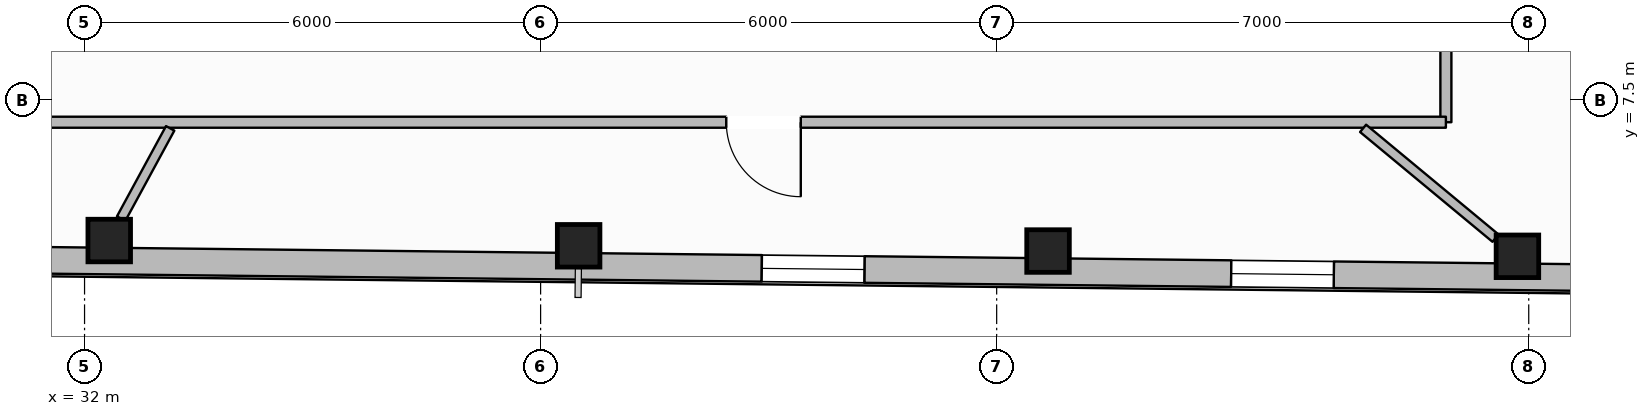
"""IFC4 building model, lengths in metres.
Left out: names, types, materials, properties, quantities, classifications, styles, units other than length and angle.
Written with IfcOpenShell. Run it as: python <this file> out.ifc"""

import sys

from ifc_helpers import new_model, si_unit, direction, frame, frame_2d, origin, origin_2d, place, context, subcontext, project, spatial, rectangle, hollow_rectangle, extrude, element, fill, save


model = new_model("IFC4")
c1 = context("Model", 3, precision=1e-05, world=origin(), true_north=direction((0.0, 1.0)))
c2 = subcontext(c1, "Body", "Model", "MODEL_VIEW")
j1 = project(units=[si_unit("LENGTHUNIT", "METRE"), si_unit("PLANEANGLEUNIT", "RADIAN")], contexts=[c1])
p1 = place(None, origin())
s1 = spatial("IfcSite", under=j1, at=p1, CompositionType="ELEMENT")
p2 = place(p1, origin())
s2 = spatial("IfcBuilding", under=s1, at=p2, CompositionType="ELEMENT")
p3 = place(p2, frame((0.0, 0.0, 254.9)))
s3 = spatial("IfcBuildingStorey", under=s2, at=p3, CompositionType="ELEMENT", Elevation=254.9)
for number, where, z_axis, x_axis in (
    (1, (32.325, 5.654, 0.0), (0.0, 0.0, 1.0), (1.0, 0.0, 0.0)),
    (2, (38.5, 5.584, 0.0), (0.0, 0.0, 1.0), (1.0, 0.0, 0.0)),
    (3, (44.676, 5.515, 0.0), (0.0, 0.0, 1.0), (1.0, 0.0, 0.0)),
    (4, (50.851, 5.446, 0.0), (0.0, 0.0, 1.0), (1.0, 0.0, 0.0)),
):
    element("IfcColumn", number, at=place(p3, frame(where, z_axis=z_axis, x_axis=x_axis)), inside=s3, PredefinedType="COLUMN", context=c2, shape_type="SweptSolid", body=[
        extrude(hollow_rectangle(XDim=0.56, YDim=0.56, WallThickness=0.025, at=origin_2d()), origin(), (0.0, 0.0, 1.0), 3.61),
    ])
p4 = place(p3, frame((57.506, 5.102, 0.0), z_axis=(0.0, 0.0, 1.0), x_axis=(-0.999937327785, 0.011195557226, 0.0)))
e5 = element("IfcWall", 5, at=p4, inside=s3, PredefinedType="STANDARD", context=c2, shape_type="SweptSolid", body=[
    extrude(rectangle(XDim=38.01, YDim=0.35, at=frame_2d((19.005, 0.0))), origin(), (0.0, 0.0, 1.0), 3.196),
])
p5 = place(p4, frame((33.775, 0.0, 0.65)))
e6 = element("IfcOpeningElement", 6, at=p5, cuts=e5, PredefinedType="OPENING", context=c2, shape_type="SweptSolid", body=[
    extrude(rectangle(XDim=1.35, YDim=1.75, at=frame_2d((0.675, 0.875))), frame((0.0, 0.185, 0.0), z_axis=(0.0, -1.0, 0.0), x_axis=(1.0, 0.0, 0.0)), (0.0, 0.0, 1.0), 0.37),
])
p6 = place(p4, frame((27.599, 0.0, 0.65)))
e7 = element("IfcOpeningElement", 7, at=p6, cuts=e5, PredefinedType="OPENING", context=c2, shape_type="SweptSolid", body=[
    extrude(rectangle(XDim=1.35, YDim=1.75, at=frame_2d((0.675, 0.875))), frame((0.0, 0.185, 0.0), z_axis=(0.0, -1.0, 0.0), x_axis=(1.0, 0.0, 0.0)), (0.0, 0.0, 1.0), 0.37),
])
p7 = place(p4, frame((15.247, 0.0, 0.65)))
e8 = element("IfcOpeningElement", 8, at=p7, cuts=e5, PredefinedType="OPENING", context=c2, shape_type="SweptSolid", body=[
    extrude(rectangle(XDim=1.35, YDim=1.75, at=frame_2d((0.675, 0.875))), frame((0.0, 0.185, 0.0), z_axis=(0.0, -1.0, 0.0), x_axis=(1.0, 0.0, 0.0)), (0.0, 0.0, 1.0), 0.37),
])
p8 = place(p4, frame((9.071, 0.0, 0.65)))
e9 = element("IfcOpeningElement", 9, at=p8, cuts=e5, PredefinedType="OPENING", context=c2, shape_type="SweptSolid", body=[
    extrude(rectangle(XDim=1.35, YDim=1.75, at=frame_2d((0.675, 0.875))), frame((0.0, 0.185, 0.0), z_axis=(0.0, -1.0, 0.0), x_axis=(1.0, 0.0, 0.0)), (0.0, 0.0, 1.0), 0.37),
])
p9 = place(p4, frame((2.896, 0.0, 0.65)))
e10 = element("IfcOpeningElement", 10, at=p9, cuts=e5, PredefinedType="OPENING", context=c2, shape_type="SweptSolid", body=[
    extrude(rectangle(XDim=1.35, YDim=1.75, at=frame_2d((0.675, 0.875))), frame((0.0, 0.185, 0.0), z_axis=(0.0, -1.0, 0.0), x_axis=(1.0, 0.0, 0.0)), (0.0, 0.0, 1.0), 0.37),
])
p10 = place(p3, frame((49.91, 12.15, 0.0), z_axis=(0.0, 0.0, 1.0), x_axis=(0.0, -1.0, 0.0)))
e11 = element("IfcWall", 11, at=p10, inside=s3, PredefinedType="PARTITIONING", context=c2, shape_type="SweptSolid", body=[
    extrude(rectangle(XDim=4.94, YDim=0.145, at=frame_2d((2.47, 0.0))), origin(), (0.0, 0.0, 1.0), 3.61),
])
p11 = place(p10, frame((1.77, 0.0, 0.0)))
e12 = element("IfcOpeningElement", 12, at=p11, cuts=e11, PredefinedType="OPENING", context=c2, shape_type="SweptSolid", body=[
    extrude(rectangle(XDim=1.4, YDim=2.2, at=frame_2d((0.7, 1.1))), frame((0.0, 0.083, 0.0), z_axis=(0.0, -1.0, 0.0), x_axis=(1.0, 0.0, 0.0)), (0.0, 0.0, 1.0), 0.165),
])
p12 = place(p3, frame((49.91, 7.21, 0.0), z_axis=(0.0, 0.0, 1.0), x_axis=(-1.0, 0.0, 0.0)))
e13 = element("IfcWall", 13, at=p12, inside=s3, PredefinedType="PARTITIONING", context=c2, shape_type="SweptSolid", body=[
    extrude(rectangle(XDim=23.82, YDim=0.145, at=frame_2d((11.91, 0.0))), origin(), (0.0, 0.0, 1.0), 3.61),
])
p13 = place(p12, frame((19.928, 0.0, 0.0)))
e14 = element("IfcOpeningElement", 14, at=p13, cuts=e13, PredefinedType="OPENING", context=c2, shape_type="SweptSolid", body=[
    extrude(rectangle(XDim=0.98, YDim=2.15, at=frame_2d((0.49, 1.075))), frame((0.0, 0.083, 0.0), z_axis=(0.0, -1.0, 0.0), x_axis=(1.0, 0.0, 0.0)), (0.0, 0.0, 1.0), 0.165),
])
p14 = place(p12, frame((8.487, 0.0, 0.0)))
e15 = element("IfcOpeningElement", 15, at=p14, cuts=e13, PredefinedType="OPENING", context=c2, shape_type="SweptSolid", body=[
    extrude(rectangle(XDim=0.98, YDim=2.15, at=frame_2d((0.49, 1.075))), frame((0.0, 0.083, 0.0), z_axis=(0.0, -1.0, 0.0), x_axis=(1.0, 0.0, 0.0)), (0.0, 0.0, 1.0), 0.165),
])
p15 = place(p3, frame((33.127, 7.129, 0.0), z_axis=(0.0, 0.0, 1.0), x_axis=(-0.47743452788, -0.878667327029, 0.0)))
e16 = element("IfcWall", 16, at=p15, inside=s3, PredefinedType="PARTITIONING", context=c2, shape_type="SweptSolid", body=[
    extrude(rectangle(XDim=1.352, YDim=0.125, at=frame_2d((0.676, 0.0))), origin(), (0.0, 0.0, 1.0), 3.61),
])
p16 = place(p3, frame((48.821, 7.129, 0.0), z_axis=(0.0, 0.0, 1.0), x_axis=(0.769836810093, -0.63824077418, 0.0)))
e17 = element("IfcWall", 17, at=p16, inside=s3, PredefinedType="PARTITIONING", context=c2, shape_type="SweptSolid", body=[
    extrude(rectangle(XDim=2.263, YDim=0.125, at=frame_2d((1.132, 0.0))), origin(), (0.0, 0.0, 1.0), 3.246),
])
p17 = place(p7, origin())
e18 = element("IfcWindow", 18, at=p17, inside=s3, PartitioningType="SINGLE_PANEL", PredefinedType="WINDOW", context=c2, shape_type="SweptSolid", body=[
    extrude(rectangle(XDim=1.35, YDim=1.75, at=frame_2d((0.675, 0.875))), frame((0.0, 0.03, 0.0), z_axis=(0.0, -1.0, 0.0), x_axis=(1.0, 0.0, 0.0)), (0.0, 0.0, 1.0), 0.06),
])
fill(e8, e18)
p18 = place(p8, origin())
e19 = element("IfcWindow", 19, at=p18, inside=s3, PartitioningType="SINGLE_PANEL", PredefinedType="WINDOW", context=c2, shape_type="SweptSolid", body=[
    extrude(rectangle(XDim=1.35, YDim=1.75, at=frame_2d((0.675, 0.875))), frame((0.0, 0.03, 0.0), z_axis=(0.0, -1.0, 0.0), x_axis=(1.0, 0.0, 0.0)), (0.0, 0.0, 1.0), 0.06),
])
fill(e9, e19)
p19 = place(p14, origin())
e20 = element("IfcDoor", 20, at=p19, inside=s3, OperationType="SINGLE_SWING_LEFT", PredefinedType="DOOR", context=c2, shape_type="SweptSolid", body=[
    extrude(rectangle(XDim=0.98, YDim=2.15, at=frame_2d((0.49, 1.075))), frame((0.0, 0.025, 0.0), z_axis=(0.0, -1.0, 0.0), x_axis=(1.0, 0.0, 0.0)), (0.0, 0.0, 1.0), 0.05),
])
fill(e15, e20)
save(model, sys.argv[1])
